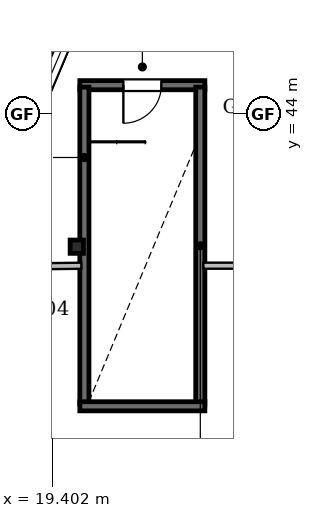
"""IFC4 building model, lengths in metres.
Left out: names, types, materials, properties, quantities, classifications, styles, units other than length and angle.
Written with IfcOpenShell. Run it as: python <this file> out.ifc"""

import sys

from ifc_helpers import new_model, si_unit, direction, frame, frame_2d, origin, origin_2d, place, context, subcontext, project, spatial, rectangle, i_section, extrude, element, fill, save


model = new_model("IFC4")
c1 = context("Model", 3, precision=1e-05, world=origin(), true_north=direction((0.0, 1.0)))
c2 = subcontext(c1, "Body", "Model", "MODEL_VIEW")
j1 = project(units=[si_unit("LENGTHUNIT", "METRE"), si_unit("PLANEANGLEUNIT", "RADIAN")], contexts=[c1])
p1 = place(None, origin())
s1 = spatial("IfcSite", under=j1, at=p1, CompositionType="ELEMENT")
p2 = place(p1, origin())
s2 = spatial("IfcBuilding", under=s1, at=p2, CompositionType="ELEMENT")
p3 = place(p2, frame((0.0, 0.0, 24.0)))
s3 = spatial("IfcBuildingStorey", under=s2, at=p3, CompositionType="ELEMENT", Elevation=24.0)
p4 = place(p3, frame((20.05, 40.5, 0.0), z_axis=(0.0, 0.0, 1.0), x_axis=(1.0, 0.0, 0.0)))
e1 = element("IfcColumn", 1, at=p4, inside=s3, PredefinedType="PILASTER", context=c2, shape_type="SweptSolid", body=[
    extrude(i_section(OverallWidth=0.35, OverallDepth=0.35, WebThickness=0.012, FlangeThickness=0.019, FilletRadius=0.02, at=origin_2d()), origin(), (0.0, 0.0, 1.0), 5.2),
])
p5 = place(p3, frame((20.748, 48.291, 0.0), z_axis=(0.0, 0.0, 1.0), x_axis=(-0.388364391847, -0.921505886658, 0.0)))
e2 = element("IfcWall", 2, at=p5, inside=s3, PredefinedType="SOLIDWALL", context=c2, shape_type="SweptSolid", body=[
    extrude(rectangle(XDim=6.533, YDim=0.34, at=frame_2d((3.266, 0.0))), origin(), (0.0, 0.0, 1.0), 4.925),
])
p6 = place(p5, frame((2.066, 0.0, 0.75)))
e3 = element("IfcOpeningElement", 3, at=p6, cuts=e2, PredefinedType="OPENING", context=c2, shape_type="SweptSolid", body=[
    extrude(rectangle(XDim=2.4, YDim=2.2, at=frame_2d((1.2, 1.1))), frame((0.0, 0.18, 0.0), z_axis=(0.0, -1.0, 0.0), x_axis=(1.0, 0.0, 0.0)), (0.0, 0.0, 1.0), 0.36),
])
p7 = place(p3, frame((20.13, 44.75, 0.0), z_axis=(0.0, 0.0, 1.0), x_axis=(1.0, 0.0, 0.0)))
e4 = element("IfcWall", 4, at=p7, inside=s3, PredefinedType="SHEAR", context=c2, shape_type="SweptSolid", body=[
    extrude(rectangle(XDim=3.29, YDim=0.24, at=frame_2d((1.645, 0.0))), origin(), (0.0, 0.0, 1.0), 4.925),
])
p8 = place(p7, frame((1.145, 0.0, 0.0)))
e5 = element("IfcOpeningElement", 5, at=p8, cuts=e4, PredefinedType="OPENING", context=c2, shape_type="SweptSolid", body=[
    extrude(rectangle(XDim=1.0, YDim=2.15, at=frame_2d((0.5, 1.075))), frame((0.0, 0.13, 0.0), z_axis=(0.0, -1.0, 0.0), x_axis=(1.0, 0.0, 0.0)), (0.0, 0.0, 1.0), 0.26),
])
for number, where, z_axis, x_axis in (
    (6, (20.25, 36.35, 0.0), (0.0, 0.0, 1.0), (0.0, 1.0, 0.0)),
    (7, (23.3, 36.35, 0.0), (0.0, 0.0, 1.0), (0.0, 1.0, 0.0)),
):
    element("IfcWall", number, at=place(p3, frame(where, z_axis=z_axis, x_axis=x_axis)), inside=s3, PredefinedType="SHEAR", context=c2, shape_type="SweptSolid", body=[
        extrude(rectangle(XDim=8.35, YDim=0.24, at=frame_2d((4.175, 0.0))), origin(), (0.0, 0.0, 1.0), 4.925),
    ])
p9 = place(p3, frame((20.13, 36.3, 0.0), z_axis=(0.0, 0.0, 1.0), x_axis=(1.0, 0.0, 0.0)))
e8 = element("IfcWall", 8, at=p9, inside=s3, PredefinedType="SHEAR", context=c2, shape_type="SweptSolid", body=[
    extrude(rectangle(XDim=3.29, YDim=0.24, at=frame_2d((1.645, 0.0))), origin(), (0.0, 0.0, 1.0), 4.925),
])
p10 = place(p3, frame((33.32, 40.0, 0.0), z_axis=(0.0, 0.0, 1.0), x_axis=(-1.0, 0.0, 0.0)))
e9 = element("IfcWall", 9, at=p10, inside=s3, PredefinedType="SOLIDWALL", context=c2, shape_type="SweptSolid", body=[
    extrude(rectangle(XDim=9.94, YDim=0.16, at=frame_2d((4.97, 0.0))), origin(), (0.0, 0.0, 1.0), 4.263),
])
p11 = place(p3, frame((20.17, 39.999, 0.0), z_axis=(0.0, 0.0, 1.0), x_axis=(-0.999920662638, -0.01259636569, 0.0)))
e10 = element("IfcWall", 10, at=p11, inside=s3, PredefinedType="SOLIDWALL", context=c2, shape_type="SweptSolid", body=[
    extrude(rectangle(XDim=2.539, YDim=0.16, at=frame_2d((1.27, 0.0))), origin(), (0.0, 0.0, 1.0), 4.925),
])
p12 = place(p6, origin())
e11 = element("IfcWindow", 11, at=p12, inside=s3, PartitioningType="SINGLE_PANEL", PredefinedType="WINDOW", context=c2, shape_type="SweptSolid", body=[
    extrude(rectangle(XDim=2.4, YDim=2.2, at=frame_2d((1.2, 1.1))), frame((0.0, 0.03, 0.0), z_axis=(0.0, -1.0, 0.0), x_axis=(1.0, 0.0, 0.0)), (0.0, 0.0, 1.0), 0.06),
])
fill(e3, e11)
p13 = place(p8, frame((1.0, 0.0, 0.0), z_axis=(0.0, 0.0, 1.0), x_axis=(-1.0, 0.0, 0.0)))
e12 = element("IfcDoor", 12, at=p13, inside=s3, OperationType="SINGLE_SWING_LEFT", PredefinedType="DOOR", context=c2, shape_type="SweptSolid", body=[
    extrude(rectangle(XDim=1.0, YDim=2.15, at=frame_2d((0.5, 1.075))), frame((0.0, 0.025, 0.0), z_axis=(0.0, -1.0, 0.0), x_axis=(1.0, 0.0, 0.0)), (0.0, 0.0, 1.0), 0.05),
])
fill(e5, e12)
save(model, sys.argv[1])
